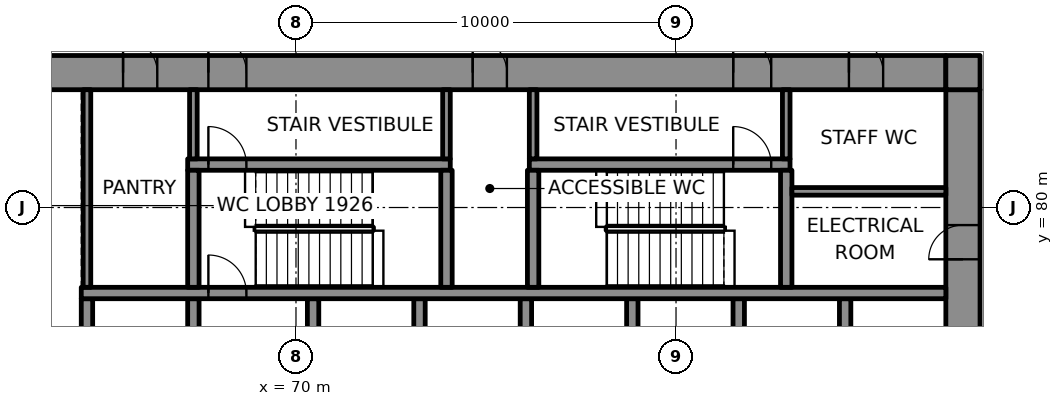
"""IFC4 building model, lengths in metres.
Left out: names, types, materials, properties, quantities, classifications, styles, units other than length and angle.
Written with IfcOpenShell. Run it as: python <this file> out.ifc"""

import sys

from ifc_helpers import new_model, si_unit, direction, frame, frame_2d, origin, place, context, subcontext, project, spatial, rectangle, extrude, element, fill, save


model = new_model("IFC4")
c1 = context("Model", 3, precision=1e-05, world=origin(), true_north=direction((0.0, 1.0)))
c2 = subcontext(c1, "Body", "Model", "MODEL_VIEW")
j1 = project(units=[si_unit("LENGTHUNIT", "METRE"), si_unit("PLANEANGLEUNIT", "RADIAN")], contexts=[c1])
p1 = place(None, origin())
s1 = spatial("IfcSite", under=j1, at=p1, CompositionType="ELEMENT")
p2 = place(p1, origin())
s2 = spatial("IfcBuilding", under=s1, at=p2, CompositionType="ELEMENT")
p3 = place(p2, frame((0.0, 0.0, 86.2)))
s3 = spatial("IfcBuildingStorey", under=s2, at=p3, CompositionType="ELEMENT", Elevation=86.2)
p4 = place(p3, frame((62.0, 83.55, 0.0), z_axis=(0.0, 0.0, 1.0), x_axis=(1.0, 0.0, 0.0)))
e1 = element("IfcWall", 1, at=p4, inside=s3, PredefinedType="SHEAR", context=c2, shape_type="SweptSolid", body=[
    extrude(rectangle(XDim=25.1, YDim=0.9, at=frame_2d((12.55, 0.0))), origin(), (0.0, 0.0, 1.0), 4.0),
])
p5 = place(p4, frame((5.695, 0.0, 0.0)))
e2 = element("IfcOpeningElement", 2, at=p5, cuts=e1, PredefinedType="OPENING", context=c2, shape_type="SweptSolid", body=[
    extrude(rectangle(XDim=1.0, YDim=2.1, at=frame_2d((0.5, 1.05))), frame((0.0, 0.46, 0.0), z_axis=(0.0, -1.0, 0.0), x_axis=(1.0, 0.0, 0.0)), (0.0, 0.0, 1.0), 0.92),
])
p6 = place(p4, frame((19.505, 0.0, 0.0)))
e3 = element("IfcOpeningElement", 3, at=p6, cuts=e1, PredefinedType="OPENING", context=c2, shape_type="SweptSolid", body=[
    extrude(rectangle(XDim=1.0, YDim=2.1, at=frame_2d((0.5, 1.05))), frame((0.0, 0.46, 0.0), z_axis=(0.0, -1.0, 0.0), x_axis=(1.0, 0.0, 0.0)), (0.0, 0.0, 1.0), 0.92),
])
p7 = place(p4, frame((3.45, 0.0, 0.0)))
e4 = element("IfcOpeningElement", 4, at=p7, cuts=e1, PredefinedType="OPENING", context=c2, shape_type="SweptSolid", body=[
    extrude(rectangle(XDim=0.9, YDim=2.1, at=frame_2d((0.45, 1.05))), frame((0.0, 0.46, 0.0), z_axis=(0.0, -1.0, 0.0), x_axis=(1.0, 0.0, 0.0)), (0.0, 0.0, 1.0), 0.92),
])
p8 = place(p4, frame((12.65, 0.0, 0.0)))
e5 = element("IfcOpeningElement", 5, at=p8, cuts=e1, PredefinedType="OPENING", context=c2, shape_type="SweptSolid", body=[
    extrude(rectangle(XDim=0.9, YDim=2.1, at=frame_2d((0.45, 1.05))), frame((0.0, 0.46, 0.0), z_axis=(0.0, -1.0, 0.0), x_axis=(1.0, 0.0, 0.0)), (0.0, 0.0, 1.0), 0.92),
])
p9 = place(p4, frame((22.55, 0.0, 0.0)))
e6 = element("IfcOpeningElement", 6, at=p9, cuts=e1, PredefinedType="OPENING", context=c2, shape_type="SweptSolid", body=[
    extrude(rectangle(XDim=0.9, YDim=2.1, at=frame_2d((0.45, 1.05))), frame((0.0, 0.46, 0.0), z_axis=(0.0, -1.0, 0.0), x_axis=(1.0, 0.0, 0.0)), (0.0, 0.0, 1.0), 0.92),
])
p10 = place(p3, frame((87.55, 66.9, 0.0), z_axis=(0.0, 0.0, 1.0), x_axis=(0.0, 1.0, 0.0)))
e7 = element("IfcWall", 7, at=p10, inside=s3, PredefinedType="SHEAR", context=c2, shape_type="SweptSolid", body=[
    extrude(rectangle(XDim=16.2, YDim=0.9, at=frame_2d((8.1, 0.0))), origin(), (0.0, 0.0, 1.0), 4.0),
])
p11 = place(p10, frame((5.5, 0.0, 0.0)))
e8 = element("IfcOpeningElement", 8, at=p11, cuts=e7, PredefinedType="OPENING", context=c2, shape_type="SweptSolid", body=[
    extrude(rectangle(XDim=1.8, YDim=2.1, at=frame_2d((0.9, 1.05))), frame((0.0, 0.46, 0.0), z_axis=(0.0, -1.0, 0.0), x_axis=(1.0, 0.0, 0.0)), (0.0, 0.0, 1.0), 0.92),
])
p12 = place(p10, frame((11.738, 0.0, 0.0)))
e9 = element("IfcOpeningElement", 9, at=p12, cuts=e7, PredefinedType="OPENING", context=c2, shape_type="SweptSolid", body=[
    extrude(rectangle(XDim=0.9, YDim=2.1, at=frame_2d((0.45, 1.05))), frame((0.0, 0.46, 0.0), z_axis=(0.0, -1.0, 0.0), x_axis=(1.0, 0.0, 0.0)), (0.0, 0.0, 1.0), 0.92),
])
for number, where, z_axis, x_axis in (
    (10, (64.5, 75.0, 0.0), (0.0, 0.0, 1.0), (0.0, 1.0, 0.0)),
    (11, (67.3, 75.0, 0.0), (0.0, 0.0, 1.0), (0.0, 1.0, 0.0)),
):
    element("IfcWall", number, at=place(p3, frame(where, z_axis=z_axis, x_axis=x_axis)), inside=s3, PredefinedType="SHEAR", context=c2, shape_type="SweptSolid", body=[
        extrude(rectangle(XDim=2.6, YDim=0.3, at=frame_2d((1.3, 0.0))), origin(), (0.0, 0.0, 1.0), 4.0),
    ])
p13 = place(p3, frame((70.45, 75.0, 0.0), z_axis=(0.0, 0.0, 1.0), x_axis=(0.0, 1.0, 0.0)))
e12 = element("IfcWall", 12, at=p13, inside=s3, PredefinedType="SHEAR", context=c2, shape_type="SweptSolid", body=[
    extrude(rectangle(XDim=2.6, YDim=0.3, at=frame_2d((1.3, 0.0))), origin(), (0.0, 0.0, 1.0), 4.0),
])
p14 = place(p13, frame((0.15, 0.0, 0.0)))
e13 = element("IfcOpeningElement", 13, at=p14, cuts=e12, PredefinedType="OPENING", context=c2, shape_type="SweptSolid", body=[
    extrude(rectangle(XDim=1.1, YDim=2.1, at=frame_2d((0.55, 1.05))), frame((0.0, 0.16, 0.0), z_axis=(0.0, -1.0, 0.0), x_axis=(1.0, 0.0, 0.0)), (0.0, 0.0, 1.0), 0.32),
])
for number, where, z_axis, x_axis in (
    (14, (73.25, 75.0, 0.0), (0.0, 0.0, 1.0), (0.0, 1.0, 0.0)),
    (15, (76.05, 75.0, 0.0), (0.0, 0.0, 1.0), (0.0, 1.0, 0.0)),
    (16, (78.85, 75.0, 0.0), (0.0, 0.0, 1.0), (0.0, 1.0, 0.0)),
    (17, (81.65, 75.0, 0.0), (0.0, 0.0, 1.0), (0.0, 1.0, 0.0)),
    (18, (84.45, 75.0, 0.0), (0.0, 0.0, 1.0), (0.0, 1.0, 0.0)),
):
    element("IfcWall", number, at=place(p3, frame(where, z_axis=z_axis, x_axis=x_axis)), inside=s3, PredefinedType="SHEAR", context=c2, shape_type="SweptSolid", body=[
        extrude(rectangle(XDim=2.6, YDim=0.3, at=frame_2d((1.3, 0.0))), origin(), (0.0, 0.0, 1.0), 4.0),
    ])
p15 = place(p3, frame((64.35, 77.75, 0.0), z_axis=(0.0, 0.0, 1.0), x_axis=(1.0, 0.0, 0.0)))
e19 = element("IfcWall", 19, at=p15, inside=s3, PredefinedType="SHEAR", context=c2, shape_type="SweptSolid", body=[
    extrude(rectangle(XDim=22.75, YDim=0.3, at=frame_2d((11.375, 0.0))), origin(), (0.0, 0.0, 1.0), 4.0),
])
p16 = place(p15, frame((3.345, 0.0, 0.0)))
e20 = element("IfcOpeningElement", 20, at=p16, cuts=e19, PredefinedType="OPENING", context=c2, shape_type="SweptSolid", body=[
    extrude(rectangle(XDim=1.0, YDim=2.1, at=frame_2d((0.5, 1.05))), frame((0.0, 0.16, 0.0), z_axis=(0.0, -1.0, 0.0), x_axis=(1.0, 0.0, 0.0)), (0.0, 0.0, 1.0), 0.32),
])
p17 = place(p3, frame((67.15, 81.13, 0.0), z_axis=(0.0, 0.0, 1.0), x_axis=(1.0, 0.0, 0.0)))
e21 = element("IfcWall", 21, at=p17, inside=s3, PredefinedType="SHEAR", context=c2, shape_type="SweptSolid", body=[
    extrude(rectangle(XDim=6.91, YDim=0.3, at=frame_2d((3.455, 0.0))), origin(), (0.0, 0.0, 1.0), 4.0),
])
p18 = place(p17, frame((0.545, 0.0, 0.0)))
e22 = element("IfcOpeningElement", 22, at=p18, cuts=e21, PredefinedType="OPENING", context=c2, shape_type="SweptSolid", body=[
    extrude(rectangle(XDim=1.0, YDim=2.1, at=frame_2d((0.5, 1.05))), frame((0.0, 0.16, 0.0), z_axis=(0.0, -1.0, 0.0), x_axis=(1.0, 0.0, 0.0)), (0.0, 0.0, 1.0), 0.32),
])
p19 = place(p3, frame((76.14, 81.13, 0.0), z_axis=(0.0, 0.0, 1.0), x_axis=(1.0, 0.0, 0.0)))
e23 = element("IfcWall", 23, at=p19, inside=s3, PredefinedType="SHEAR", context=c2, shape_type="SweptSolid", body=[
    extrude(rectangle(XDim=6.86, YDim=0.3, at=frame_2d((3.43, 0.0))), origin(), (0.0, 0.0, 1.0), 4.0),
])
p20 = place(p19, frame((5.365, 0.0, 0.0)))
e24 = element("IfcOpeningElement", 24, at=p20, cuts=e23, PredefinedType="OPENING", context=c2, shape_type="SweptSolid", body=[
    extrude(rectangle(XDim=1.0, YDim=2.1, at=frame_2d((0.5, 1.05))), frame((0.0, 0.16, 0.0), z_axis=(0.0, -1.0, 0.0), x_axis=(1.0, 0.0, 0.0)), (0.0, 0.0, 1.0), 0.32),
])
for number, where, z_axis, x_axis in (
    (25, (67.3, 77.9, 0.0), (0.0, 0.0, 1.0), (0.0, 1.0, 0.0)),
    (26, (73.96, 77.9, 0.0), (0.0, 0.0, 1.0), (0.0, 1.0, 0.0)),
    (27, (76.24, 77.9, 0.0), (0.0, 0.0, 1.0), (0.0, 1.0, 0.0)),
    (28, (82.9, 77.9, 0.0), (0.0, 0.0, 1.0), (0.0, 1.0, 0.0)),
):
    element("IfcWall", number, at=place(p3, frame(where, z_axis=z_axis, x_axis=x_axis)), inside=s3, PredefinedType="SHEAR", context=c2, shape_type="SweptSolid", body=[
        extrude(rectangle(XDim=3.08, YDim=0.3, at=frame_2d((1.54, 0.0))), origin(), (0.0, 0.0, 1.0), 4.0),
    ])
p21 = place(p3, frame((87.1, 83.55, 0.0), z_axis=(0.0, 0.0, 1.0), x_axis=(1.0, 0.0, 0.0)))
e29 = element("IfcWall", 29, at=p21, inside=s3, PredefinedType="SHEAR", context=c2, shape_type="SweptSolid", body=[
    extrude(rectangle(XDim=0.9, YDim=0.9, at=frame_2d((0.45, 0.0))), origin(), (0.0, 0.0, 1.0), 4.0),
])
p22 = place(p3, frame((69.117, 112.712, 0.0), z_axis=(0.0, 0.0, 1.0), x_axis=(-0.499998392273, -0.866026332004, 0.0)))
e30 = element("IfcWall", 30, at=p22, inside=s3, PredefinedType="SOLIDWALL", context=c2, shape_type="SweptSolid", body=[
    extrude(rectangle(XDim=34.311, YDim=0.8, at=frame_2d((17.156, 0.0))), origin(), (0.0, 0.0, 1.0), 0.9),
])
p23 = place(p3, frame((83.05, 80.425, 0.0), z_axis=(0.0, 0.0, 1.0), x_axis=(1.0, 0.0, 0.0)))
e31 = element("IfcWall", 31, at=p23, inside=s3, PredefinedType="PARTITIONING", context=c2, shape_type="SweptSolid", body=[
    extrude(rectangle(XDim=4.05, YDim=0.2, at=frame_2d((2.025, 0.0))), origin(), (0.0, 0.0, 1.0), 4.0),
])
p24 = place(p3, frame((64.5, 77.9, 0.0), z_axis=(0.0, 0.0, 1.0), x_axis=(0.0, 1.0, 0.0)))
e32 = element("IfcWall", 32, at=p24, inside=s3, PredefinedType="PARTITIONING", context=c2, shape_type="SweptSolid", body=[
    extrude(rectangle(XDim=5.2, YDim=0.2, at=frame_2d((2.6, 0.0))), origin(), (0.0, 0.0, 1.0), 4.0),
])
for number, where, z_axis, x_axis in (
    (33, (67.3, 81.28, 0.0), (0.0, 0.0, 1.0), (0.0, 1.0, 0.0)),
    (34, (73.96, 81.28, 0.0), (0.0, 0.0, 1.0), (0.0, 1.0, 0.0)),
    (35, (76.24, 81.28, 0.0), (0.0, 0.0, 1.0), (0.0, 1.0, 0.0)),
    (36, (82.9, 81.28, 0.0), (0.0, 0.0, 1.0), (0.0, 1.0, 0.0)),
):
    element("IfcWall", number, at=place(p3, frame(where, z_axis=z_axis, x_axis=x_axis)), inside=s3, PredefinedType="PARTITIONING", context=c2, shape_type="SweptSolid", body=[
        extrude(rectangle(XDim=1.82, YDim=0.2, at=frame_2d((0.91, 0.0))), origin(), (0.0, 0.0, 1.0), 4.0),
    ])
p25 = place(p16, origin())
e37 = element("IfcDoor", 37, at=p25, inside=s3, OperationType="SINGLE_SWING_LEFT", PredefinedType="DOOR", context=c2, shape_type="SweptSolid", body=[
    extrude(rectangle(XDim=1.0, YDim=2.1, at=frame_2d((0.5, 1.05))), frame((0.0, 0.025, 0.0), z_axis=(0.0, -1.0, 0.0), x_axis=(1.0, 0.0, 0.0)), (0.0, 0.0, 1.0), 0.05),
])
fill(e20, e37)
p26 = place(p18, origin())
e38 = element("IfcDoor", 38, at=p26, inside=s3, OperationType="SINGLE_SWING_RIGHT", PredefinedType="DOOR", context=c2, shape_type="SweptSolid", body=[
    extrude(rectangle(XDim=1.0, YDim=2.1, at=frame_2d((0.5, 1.05))), frame((0.0, 0.025, 0.0), z_axis=(0.0, -1.0, 0.0), x_axis=(1.0, 0.0, 0.0)), (0.0, 0.0, 1.0), 0.05),
])
fill(e22, e38)
p27 = place(p5, origin())
e39 = element("IfcDoor", 39, at=p27, inside=s3, OperationType="SINGLE_SWING_LEFT", PredefinedType="DOOR", context=c2, shape_type="SweptSolid", body=[
    extrude(rectangle(XDim=1.0, YDim=2.1, at=frame_2d((0.5, 1.05))), frame((0.0, 0.17, 0.0), z_axis=(0.0, -1.0, 0.0), x_axis=(1.0, 0.0, 0.0)), (0.0, 0.0, 1.0), 0.34),
])
fill(e2, e39)
p28 = place(p20, origin())
e40 = element("IfcDoor", 40, at=p28, inside=s3, OperationType="SINGLE_SWING_RIGHT", PredefinedType="DOOR", context=c2, shape_type="SweptSolid", body=[
    extrude(rectangle(XDim=1.0, YDim=2.1, at=frame_2d((0.5, 1.05))), frame((0.0, 0.025, 0.0), z_axis=(0.0, -1.0, 0.0), x_axis=(1.0, 0.0, 0.0)), (0.0, 0.0, 1.0), 0.05),
])
fill(e24, e40)
p29 = place(p6, origin())
e41 = element("IfcDoor", 41, at=p29, inside=s3, OperationType="SINGLE_SWING_LEFT", PredefinedType="DOOR", context=c2, shape_type="SweptSolid", body=[
    extrude(rectangle(XDim=1.0, YDim=2.1, at=frame_2d((0.5, 1.05))), frame((0.0, 0.17, 0.0), z_axis=(0.0, -1.0, 0.0), x_axis=(1.0, 0.0, 0.0)), (0.0, 0.0, 1.0), 0.34),
])
fill(e3, e41)
p30 = place(p7, origin())
e42 = element("IfcDoor", 42, at=p30, inside=s3, OperationType="SINGLE_SWING_RIGHT", PredefinedType="DOOR", context=c2, shape_type="SweptSolid", body=[
    extrude(rectangle(XDim=0.9, YDim=2.1, at=frame_2d((0.45, 1.05))), frame((0.0, 0.17, 0.0), z_axis=(0.0, -1.0, 0.0), x_axis=(1.0, 0.0, 0.0)), (0.0, 0.0, 1.0), 0.34),
])
fill(e4, e42)
p31 = place(p8, origin())
e43 = element("IfcDoor", 43, at=p31, inside=s3, OperationType="SINGLE_SWING_LEFT", PredefinedType="DOOR", context=c2, shape_type="SweptSolid", body=[
    extrude(rectangle(XDim=0.9, YDim=2.1, at=frame_2d((0.45, 1.05))), frame((0.0, 0.17, 0.0), z_axis=(0.0, -1.0, 0.0), x_axis=(1.0, 0.0, 0.0)), (0.0, 0.0, 1.0), 0.34),
])
fill(e5, e43)
p32 = place(p12, origin())
e44 = element("IfcDoor", 44, at=p32, inside=s3, OperationType="SINGLE_SWING_RIGHT", PredefinedType="DOOR", context=c2, shape_type="SweptSolid", body=[
    extrude(rectangle(XDim=0.9, YDim=2.1, at=frame_2d((0.45, 1.05))), frame((0.0, 0.17, 0.0), z_axis=(0.0, -1.0, 0.0), x_axis=(1.0, 0.0, 0.0)), (0.0, 0.0, 1.0), 0.34),
])
fill(e9, e44)
p33 = place(p9, origin())
e45 = element("IfcDoor", 45, at=p33, inside=s3, OperationType="SINGLE_SWING_LEFT", PredefinedType="DOOR", context=c2, shape_type="SweptSolid", body=[
    extrude(rectangle(XDim=0.9, YDim=2.1, at=frame_2d((0.45, 1.05))), frame((0.0, 0.17, 0.0), z_axis=(0.0, -1.0, 0.0), x_axis=(1.0, 0.0, 0.0)), (0.0, 0.0, 1.0), 0.34),
])
fill(e6, e45)
save(model, sys.argv[1])
